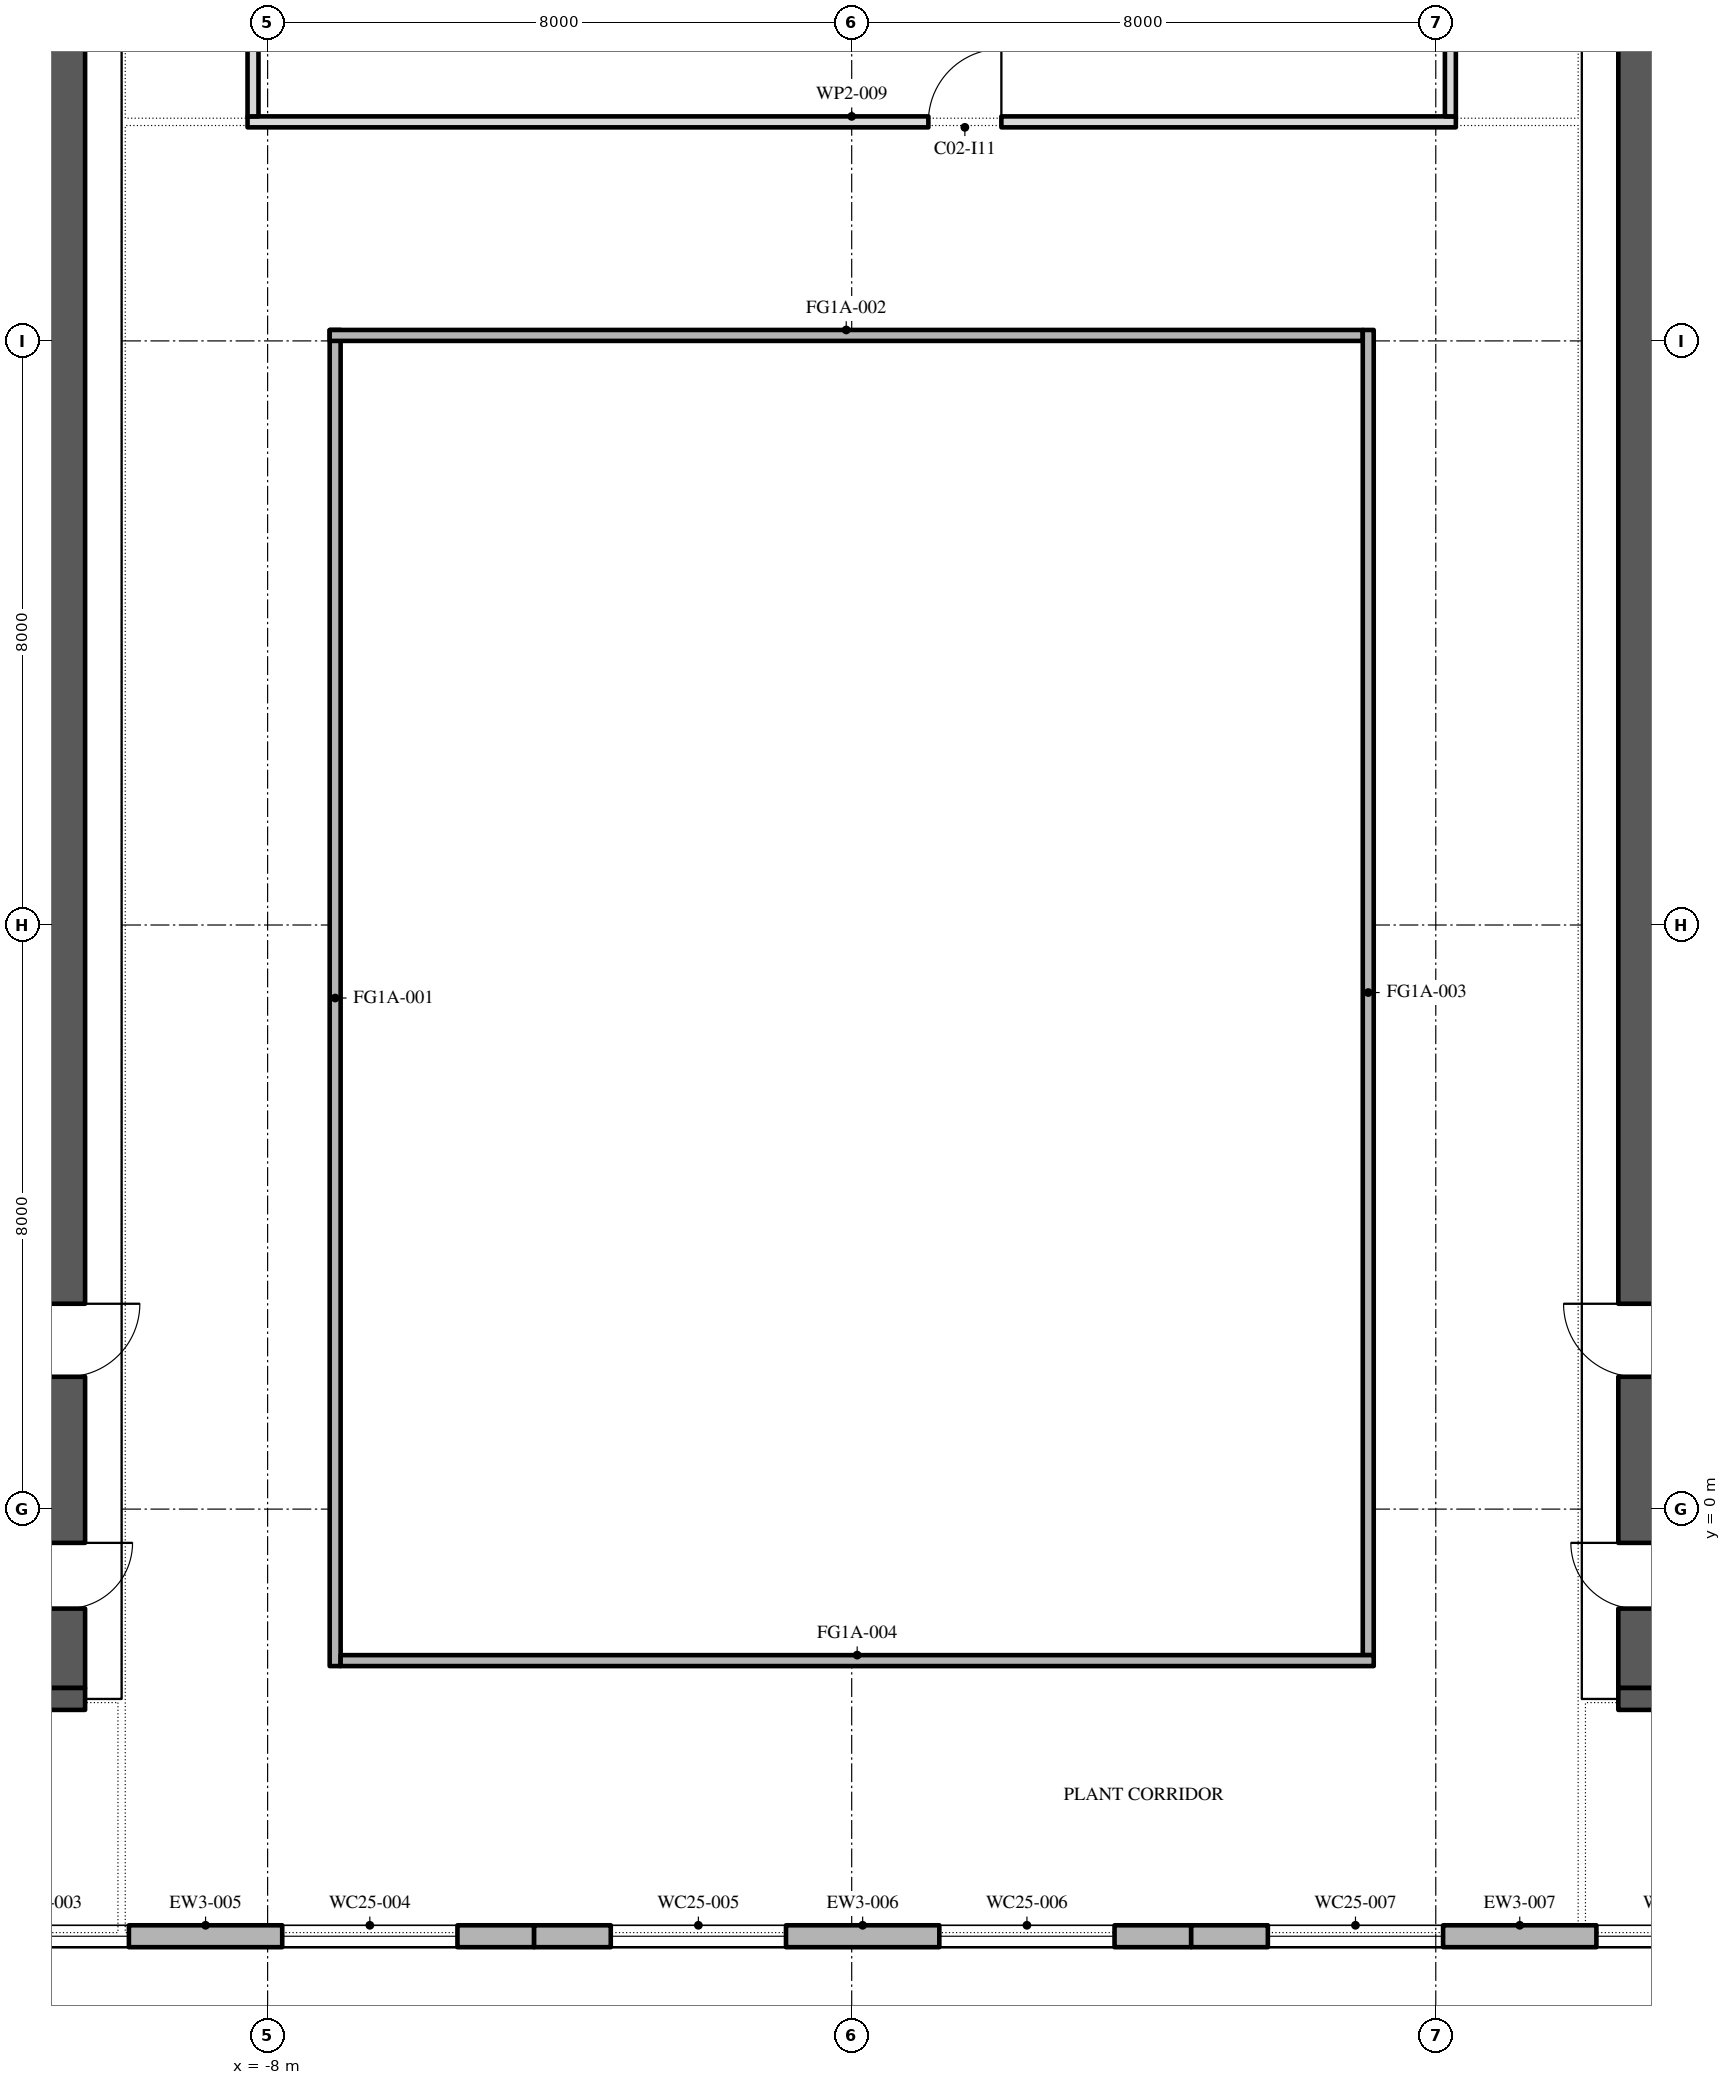
"""IFC4 building model, lengths in metres.
Left out: names, types, materials, properties, quantities, classifications, styles, units other than length and angle.
Written with IfcOpenShell. Run it as: python <this file> out.ifc"""

import sys

from ifc_helpers import new_model, si_unit, direction, frame, frame_2d, origin, place, context, subcontext, project, spatial, polyline, rectangle, outline, extrude, element, fill, save


model = new_model("IFC4")
c1 = context("Model", 3, precision=1e-05, world=origin(), true_north=direction((0.0, 1.0)))
c2 = subcontext(c1, "Body", "Model", "MODEL_VIEW")
j1 = project(units=[si_unit("LENGTHUNIT", "METRE"), si_unit("PLANEANGLEUNIT", "RADIAN")], contexts=[c1])
p1 = place(None, origin())
s1 = spatial("IfcSite", under=j1, at=p1, CompositionType="ELEMENT")
p2 = place(p1, origin())
s2 = spatial("IfcBuilding", under=s1, at=p2, CompositionType="ELEMENT")
p3 = place(p2, frame((0.0, 0.0, 373.2)))
s3 = spatial("IfcBuildingStorey", under=s2, at=p3, CompositionType="ELEMENT", Elevation=373.2)
p4 = place(p3, frame((-7.075, -2.15, 0.0), z_axis=(0.0, 0.0, 1.0), x_axis=(0.0, 1.0, 0.0)))
e1 = element("IfcWall", 1, at=p4, inside=s3, PredefinedType="STANDARD", context=c2, shape_type="SweptSolid", body=[
    extrude(rectangle(XDim=18.3, YDim=0.15, at=frame_2d((9.15, 0.0))), origin(), (0.0, 0.0, 1.0), 4.0),
])
p5 = place(p3, frame((-7.15, 16.075, 0.0), z_axis=(0.0, 0.0, 1.0), x_axis=(1.0, 0.0, 0.0)))
e2 = element("IfcWall", 2, at=p5, inside=s3, PredefinedType="STANDARD", context=c2, shape_type="SweptSolid", body=[
    extrude(rectangle(XDim=14.15, YDim=0.15, at=frame_2d((7.075, 0.0))), origin(), (0.0, 0.0, 1.0), 4.0),
])
p6 = place(p3, frame((7.075, 16.15, 0.0), z_axis=(0.0, 0.0, 1.0), x_axis=(0.0, -1.0, 0.0)))
e3 = element("IfcWall", 3, at=p6, inside=s3, PredefinedType="STANDARD", context=c2, shape_type="SweptSolid", body=[
    extrude(rectangle(XDim=18.15, YDim=0.15, at=frame_2d((9.075, 0.0))), origin(), (0.0, 0.0, 1.0), 4.0),
])
p7 = place(p3, frame((7.15, -2.075, 0.0), z_axis=(0.0, 0.0, 1.0), x_axis=(-1.0, 0.0, 0.0)))
e4 = element("IfcWall", 4, at=p7, inside=s3, PredefinedType="STANDARD", context=c2, shape_type="SweptSolid", body=[
    extrude(rectangle(XDim=14.15, YDim=0.15, at=frame_2d((7.075, 0.0))), origin(), (0.0, 0.0, 1.0), 4.0),
])
p8 = place(p3, frame((-13.35, -5.85, 0.0), z_axis=(0.0, 0.0, 1.0), x_axis=(1.0, 0.0, 0.0)))
e5 = element("IfcWall", 5, at=p8, inside=s3, PredefinedType="STANDARD", context=c2, shape_type="SweptSolid", body=[
    extrude(rectangle(XDim=9.0, YDim=0.3, at=frame_2d((4.5, 0.0))), origin(), (0.0, 0.0, 1.0), 4.0),
])
p9 = place(p8, frame((1.05, 0.0, 0.8)))
e6 = element("IfcOpeningElement", 6, at=p9, cuts=e5, PredefinedType="OPENING", context=c2, shape_type="SweptSolid", body=[
    extrude(outline(polyline([(0.0, 0.0), (2.4, 0.0), (2.4, 1.25), (2.377, 1.488), (2.31, 1.717), (2.2, 1.929), (2.051, 2.116), (1.87, 2.272), (1.663, 2.391), (1.437, 2.468), (1.2, 2.5), (0.963, 2.468), (0.737, 2.391), (0.53, 2.272), (0.349, 2.116), (0.2, 1.929), (0.09, 1.717), (0.023, 1.488), (0.0, 1.25), (0.0, 0.0)])), frame((0.0, 0.16, 0.0), z_axis=(0.0, -1.0, 0.0), x_axis=(1.0, 0.0, 0.0)), (0.0, 0.0, 1.0), 0.32),
])
p10 = place(p8, frame((5.55, 0.0, 0.8)))
e7 = element("IfcOpeningElement", 7, at=p10, cuts=e5, PredefinedType="OPENING", context=c2, shape_type="SweptSolid", body=[
    extrude(outline(polyline([(0.0, 0.0), (2.4, 0.0), (2.4, 1.25), (2.377, 1.488), (2.31, 1.717), (2.2, 1.929), (2.051, 2.116), (1.87, 2.272), (1.663, 2.391), (1.437, 2.468), (1.2, 2.5), (0.963, 2.468), (0.737, 2.391), (0.53, 2.272), (0.349, 2.116), (0.2, 1.929), (0.09, 1.717), (0.023, 1.488), (0.0, 1.25), (0.0, 0.0)])), frame((0.0, 0.16, 0.0), z_axis=(0.0, -1.0, 0.0), x_axis=(1.0, 0.0, 0.0)), (0.0, 0.0, 1.0), 0.32),
])
p11 = place(p3, frame((-4.35, -5.85, 0.0), z_axis=(0.0, 0.0, 1.0), x_axis=(1.0, 0.0, 0.0)))
e8 = element("IfcWall", 8, at=p11, inside=s3, PredefinedType="STANDARD", context=c2, shape_type="SweptSolid", body=[
    extrude(rectangle(XDim=9.0, YDim=0.3, at=frame_2d((4.5, 0.0))), origin(), (0.0, 0.0, 1.0), 4.0),
])
p12 = place(p11, frame((1.05, 0.0, 0.8)))
e9 = element("IfcOpeningElement", 9, at=p12, cuts=e8, PredefinedType="OPENING", context=c2, shape_type="SweptSolid", body=[
    extrude(outline(polyline([(0.0, 0.0), (2.4, 0.0), (2.4, 1.25), (2.377, 1.488), (2.31, 1.717), (2.2, 1.929), (2.051, 2.116), (1.87, 2.272), (1.663, 2.391), (1.437, 2.468), (1.2, 2.5), (0.963, 2.468), (0.737, 2.391), (0.53, 2.272), (0.349, 2.116), (0.2, 1.929), (0.09, 1.717), (0.023, 1.488), (0.0, 1.25), (0.0, 0.0)])), frame((0.0, 0.16, 0.0), z_axis=(0.0, -1.0, 0.0), x_axis=(1.0, 0.0, 0.0)), (0.0, 0.0, 1.0), 0.32),
])
p13 = place(p11, frame((5.55, 0.0, 0.8)))
e10 = element("IfcOpeningElement", 10, at=p13, cuts=e8, PredefinedType="OPENING", context=c2, shape_type="SweptSolid", body=[
    extrude(outline(polyline([(0.0, 0.0), (2.4, 0.0), (2.4, 1.25), (2.377, 1.488), (2.31, 1.717), (2.2, 1.929), (2.051, 2.116), (1.87, 2.272), (1.663, 2.391), (1.437, 2.468), (1.2, 2.5), (0.963, 2.468), (0.737, 2.391), (0.53, 2.272), (0.349, 2.116), (0.2, 1.929), (0.09, 1.717), (0.023, 1.488), (0.0, 1.25), (0.0, 0.0)])), frame((0.0, 0.16, 0.0), z_axis=(0.0, -1.0, 0.0), x_axis=(1.0, 0.0, 0.0)), (0.0, 0.0, 1.0), 0.32),
])
p14 = place(p3, frame((4.65, -5.85, 0.0), z_axis=(0.0, 0.0, 1.0), x_axis=(1.0, 0.0, 0.0)))
e11 = element("IfcWall", 11, at=p14, inside=s3, PredefinedType="STANDARD", context=c2, shape_type="SweptSolid", body=[
    extrude(rectangle(XDim=9.0, YDim=0.3, at=frame_2d((4.5, 0.0))), origin(), (0.0, 0.0, 1.0), 4.0),
])
p15 = place(p14, frame((1.05, 0.0, 0.8)))
e12 = element("IfcOpeningElement", 12, at=p15, cuts=e11, PredefinedType="OPENING", context=c2, shape_type="SweptSolid", body=[
    extrude(outline(polyline([(0.0, 0.0), (2.4, 0.0), (2.4, 1.25), (2.377, 1.488), (2.31, 1.717), (2.2, 1.929), (2.051, 2.116), (1.87, 2.272), (1.663, 2.391), (1.437, 2.468), (1.2, 2.5), (0.963, 2.468), (0.737, 2.391), (0.53, 2.272), (0.349, 2.116), (0.2, 1.929), (0.09, 1.717), (0.023, 1.488), (0.0, 1.25), (0.0, 0.0)])), frame((0.0, 0.16, 0.0), z_axis=(0.0, -1.0, 0.0), x_axis=(1.0, 0.0, 0.0)), (0.0, 0.0, 1.0), 0.32),
])
p16 = place(p14, frame((5.55, 0.0, 0.8)))
e13 = element("IfcOpeningElement", 13, at=p16, cuts=e11, PredefinedType="OPENING", context=c2, shape_type="SweptSolid", body=[
    extrude(outline(polyline([(0.0, 0.0), (2.4, 0.0), (2.4, 1.25), (2.377, 1.488), (2.31, 1.717), (2.2, 1.929), (2.051, 2.116), (1.87, 2.272), (1.663, 2.391), (1.437, 2.468), (1.2, 2.5), (0.963, 2.468), (0.737, 2.391), (0.53, 2.272), (0.349, 2.116), (0.2, 1.929), (0.09, 1.717), (0.023, 1.488), (0.0, 1.25), (0.0, 0.0)])), frame((0.0, 0.16, 0.0), z_axis=(0.0, -1.0, 0.0), x_axis=(1.0, 0.0, 0.0)), (0.0, 0.0, 1.0), 0.32),
])
p17 = place(p3, frame((-10.75, -2.45, 0.0), z_axis=(0.0, 0.0, 1.0), x_axis=(0.0, 1.0, 0.0)))
e14 = element("IfcWall", 14, at=p17, inside=s3, PredefinedType="SHEAR", context=c2, shape_type="SweptSolid", body=[
    extrude(rectangle(XDim=27.9, YDim=0.5, at=frame_2d((13.95, 0.0))), origin(), (0.0, 0.0, 1.0), 4.0),
])
p18 = place(p17, frame((23.65, 0.0, 0.0)))
e15 = element("IfcOpeningElement", 15, at=p18, cuts=e14, PredefinedType="OPENING", context=c2, shape_type="SweptSolid", body=[
    extrude(rectangle(XDim=2.4, YDim=2.1, at=frame_2d((1.2, 1.05))), frame((0.0, 0.26, 0.0), z_axis=(0.0, -1.0, 0.0), x_axis=(1.0, 0.0, 0.0)), (0.0, 0.0, 1.0), 0.52),
])
p19 = place(p17, frame((1.087, 0.0, 0.0)))
e16 = element("IfcOpeningElement", 16, at=p19, cuts=e14, PredefinedType="OPENING", context=c2, shape_type="SweptSolid", body=[
    extrude(rectangle(XDim=0.9, YDim=2.1, at=frame_2d((0.45, 1.05))), frame((0.0, 0.26, 0.0), z_axis=(0.0, -1.0, 0.0), x_axis=(1.0, 0.0, 0.0)), (0.0, 0.0, 1.0), 0.52),
])
p20 = place(p17, frame((4.262, 0.0, 0.0)))
e17 = element("IfcOpeningElement", 17, at=p20, cuts=e14, PredefinedType="OPENING", context=c2, shape_type="SweptSolid", body=[
    extrude(rectangle(XDim=1.0, YDim=2.1, at=frame_2d((0.5, 1.05))), frame((0.0, 0.26, 0.0), z_axis=(0.0, -1.0, 0.0), x_axis=(1.0, 0.0, 0.0)), (0.0, 0.0, 1.0), 0.52),
])
p21 = place(p3, frame((-21.5, -2.6, 0.0), z_axis=(0.0, 0.0, 1.0), x_axis=(1.0, 0.0, 0.0)))
e18 = element("IfcWall", 18, at=p21, inside=s3, PredefinedType="SHEAR", context=c2, shape_type="SweptSolid", body=[
    extrude(rectangle(XDim=11.0, YDim=0.3, at=frame_2d((5.5, 0.0))), origin(), (0.0, 0.0, 1.0), 4.0),
])
p22 = place(p3, frame((10.75, -2.45, 0.0), z_axis=(0.0, 0.0, 1.0), x_axis=(0.0, 1.0, 0.0)))
e19 = element("IfcWall", 19, at=p22, inside=s3, PredefinedType="SHEAR", context=c2, shape_type="SweptSolid", body=[
    extrude(rectangle(XDim=27.9, YDim=0.5, at=frame_2d((13.95, 0.0))), origin(), (0.0, 0.0, 1.0), 4.0),
])
p23 = place(p22, frame((23.65, 0.0, 0.0)))
e20 = element("IfcOpeningElement", 20, at=p23, cuts=e19, PredefinedType="OPENING", context=c2, shape_type="SweptSolid", body=[
    extrude(rectangle(XDim=2.4, YDim=2.1, at=frame_2d((1.2, 1.05))), frame((0.0, 0.26, 0.0), z_axis=(0.0, -1.0, 0.0), x_axis=(1.0, 0.0, 0.0)), (0.0, 0.0, 1.0), 0.52),
])
p24 = place(p22, frame((1.087, 0.0, 0.0)))
e21 = element("IfcOpeningElement", 21, at=p24, cuts=e19, PredefinedType="OPENING", context=c2, shape_type="SweptSolid", body=[
    extrude(rectangle(XDim=0.9, YDim=2.1, at=frame_2d((0.45, 1.05))), frame((0.0, 0.26, 0.0), z_axis=(0.0, -1.0, 0.0), x_axis=(1.0, 0.0, 0.0)), (0.0, 0.0, 1.0), 0.52),
])
p25 = place(p22, frame((4.262, 0.0, 0.0)))
e22 = element("IfcOpeningElement", 22, at=p25, cuts=e19, PredefinedType="OPENING", context=c2, shape_type="SweptSolid", body=[
    extrude(rectangle(XDim=1.0, YDim=2.1, at=frame_2d((0.5, 1.05))), frame((0.0, 0.26, 0.0), z_axis=(0.0, -1.0, 0.0), x_axis=(1.0, 0.0, 0.0)), (0.0, 0.0, 1.0), 0.52),
])
p26 = place(p3, frame((10.5, -2.6, 0.0), z_axis=(0.0, 0.0, 1.0), x_axis=(1.0, 0.0, 0.0)))
e23 = element("IfcWall", 23, at=p26, inside=s3, PredefinedType="SHEAR", context=c2, shape_type="SweptSolid", body=[
    extrude(rectangle(XDim=11.0, YDim=0.3, at=frame_2d((5.5, 0.0))), origin(), (0.0, 0.0, 1.0), 4.0),
])
p27 = place(p3, frame((-8.275, 19.0, 0.0), z_axis=(0.0, 0.0, 1.0), x_axis=(1.0, 0.0, 0.0)))
e24 = element("IfcWall", 24, at=p27, inside=s3, PredefinedType="PARTITIONING", context=c2, shape_type="SweptSolid", body=[
    extrude(rectangle(XDim=16.55, YDim=0.15, at=frame_2d((8.275, 0.0))), origin(), (0.0, 0.0, 1.0), 4.0),
])
p28 = place(p27, frame((9.325, 0.0, 0.0)))
e25 = element("IfcOpeningElement", 25, at=p28, cuts=e24, PredefinedType="OPENING", context=c2, shape_type="SweptSolid", body=[
    extrude(rectangle(XDim=1.0, YDim=2.1, at=frame_2d((0.5, 1.05))), frame((0.0, 0.085, 0.0), z_axis=(0.0, -1.0, 0.0), x_axis=(1.0, 0.0, 0.0)), (0.0, 0.0, 1.0), 0.17),
])
for number, where, z_axis, x_axis in (
    (26, (-8.2, 26.005, 0.0), (0.0, 0.0, 1.0), (0.0, -1.0, 0.0)),
    (27, (8.2, 19.075, 0.0), (0.0, 0.0, 1.0), (0.0, 1.0, 0.0)),
):
    element("IfcWall", number, at=place(p3, frame(where, z_axis=z_axis, x_axis=x_axis)), inside=s3, PredefinedType="PARTITIONING", context=c2, shape_type="SweptSolid", body=[
        extrude(rectangle(XDim=6.93, YDim=0.15, at=frame_2d((3.465, 0.0))), origin(), (0.0, 0.0, 1.0), 4.0),
    ])
p29 = place(p9, origin())
e28 = element("IfcWindow", 28, at=p29, inside=s3, PartitioningType="DOUBLE_PANEL_VERTICAL", PredefinedType="WINDOW", context=c2, shape_type="SweptSolid", body=[
    extrude(outline(polyline([(0.0, 0.0), (2.4, 0.0), (2.4, 1.25), (2.377, 1.488), (2.31, 1.717), (2.2, 1.929), (2.051, 2.116), (1.87, 2.272), (1.663, 2.391), (1.437, 2.468), (1.2, 2.5), (0.963, 2.468), (0.737, 2.391), (0.53, 2.272), (0.349, 2.116), (0.2, 1.929), (0.09, 1.717), (0.023, 1.488), (0.0, 1.25), (0.0, 0.0)])), frame((0.0, 0.03, 0.0), z_axis=(0.0, -1.0, 0.0), x_axis=(1.0, 0.0, 0.0)), (0.0, 0.0, 1.0), 0.06),
])
fill(e6, e28)
p30 = place(p10, origin())
e29 = element("IfcWindow", 29, at=p30, inside=s3, PartitioningType="DOUBLE_PANEL_VERTICAL", PredefinedType="WINDOW", context=c2, shape_type="SweptSolid", body=[
    extrude(outline(polyline([(0.0, 0.0), (2.4, 0.0), (2.4, 1.25), (2.377, 1.488), (2.31, 1.717), (2.2, 1.929), (2.051, 2.116), (1.87, 2.272), (1.663, 2.391), (1.437, 2.468), (1.2, 2.5), (0.963, 2.468), (0.737, 2.391), (0.53, 2.272), (0.349, 2.116), (0.2, 1.929), (0.09, 1.717), (0.023, 1.488), (0.0, 1.25), (0.0, 0.0)])), frame((0.0, 0.03, 0.0), z_axis=(0.0, -1.0, 0.0), x_axis=(1.0, 0.0, 0.0)), (0.0, 0.0, 1.0), 0.06),
])
fill(e7, e29)
p31 = place(p12, origin())
e30 = element("IfcWindow", 30, at=p31, inside=s3, PartitioningType="DOUBLE_PANEL_VERTICAL", PredefinedType="WINDOW", context=c2, shape_type="SweptSolid", body=[
    extrude(outline(polyline([(0.0, 0.0), (2.4, 0.0), (2.4, 1.25), (2.377, 1.488), (2.31, 1.717), (2.2, 1.929), (2.051, 2.116), (1.87, 2.272), (1.663, 2.391), (1.437, 2.468), (1.2, 2.5), (0.963, 2.468), (0.737, 2.391), (0.53, 2.272), (0.349, 2.116), (0.2, 1.929), (0.09, 1.717), (0.023, 1.488), (0.0, 1.25), (0.0, 0.0)])), frame((0.0, 0.03, 0.0), z_axis=(0.0, -1.0, 0.0), x_axis=(1.0, 0.0, 0.0)), (0.0, 0.0, 1.0), 0.06),
])
fill(e9, e30)
p32 = place(p13, origin())
e31 = element("IfcWindow", 31, at=p32, inside=s3, PartitioningType="DOUBLE_PANEL_VERTICAL", PredefinedType="WINDOW", context=c2, shape_type="SweptSolid", body=[
    extrude(outline(polyline([(0.0, 0.0), (2.4, 0.0), (2.4, 1.25), (2.377, 1.488), (2.31, 1.717), (2.2, 1.929), (2.051, 2.116), (1.87, 2.272), (1.663, 2.391), (1.437, 2.468), (1.2, 2.5), (0.963, 2.468), (0.737, 2.391), (0.53, 2.272), (0.349, 2.116), (0.2, 1.929), (0.09, 1.717), (0.023, 1.488), (0.0, 1.25), (0.0, 0.0)])), frame((0.0, 0.03, 0.0), z_axis=(0.0, -1.0, 0.0), x_axis=(1.0, 0.0, 0.0)), (0.0, 0.0, 1.0), 0.06),
])
fill(e10, e31)
p33 = place(p15, origin())
e32 = element("IfcWindow", 32, at=p33, inside=s3, PartitioningType="DOUBLE_PANEL_VERTICAL", PredefinedType="WINDOW", context=c2, shape_type="SweptSolid", body=[
    extrude(outline(polyline([(0.0, 0.0), (2.4, 0.0), (2.4, 1.25), (2.377, 1.488), (2.31, 1.717), (2.2, 1.929), (2.051, 2.116), (1.87, 2.272), (1.663, 2.391), (1.437, 2.468), (1.2, 2.5), (0.963, 2.468), (0.737, 2.391), (0.53, 2.272), (0.349, 2.116), (0.2, 1.929), (0.09, 1.717), (0.023, 1.488), (0.0, 1.25), (0.0, 0.0)])), frame((0.0, 0.03, 0.0), z_axis=(0.0, -1.0, 0.0), x_axis=(1.0, 0.0, 0.0)), (0.0, 0.0, 1.0), 0.06),
])
fill(e12, e32)
p34 = place(p16, origin())
e33 = element("IfcWindow", 33, at=p34, inside=s3, PartitioningType="DOUBLE_PANEL_VERTICAL", PredefinedType="WINDOW", context=c2, shape_type="SweptSolid", body=[
    extrude(outline(polyline([(0.0, 0.0), (2.4, 0.0), (2.4, 1.25), (2.377, 1.488), (2.31, 1.717), (2.2, 1.929), (2.051, 2.116), (1.87, 2.272), (1.663, 2.391), (1.437, 2.468), (1.2, 2.5), (0.963, 2.468), (0.737, 2.391), (0.53, 2.272), (0.349, 2.116), (0.2, 1.929), (0.09, 1.717), (0.023, 1.488), (0.0, 1.25), (0.0, 0.0)])), frame((0.0, 0.03, 0.0), z_axis=(0.0, -1.0, 0.0), x_axis=(1.0, 0.0, 0.0)), (0.0, 0.0, 1.0), 0.06),
])
fill(e13, e33)
p35 = place(p28, origin())
e34 = element("IfcDoor", 34, at=p35, inside=s3, OperationType="SINGLE_SWING_LEFT", PredefinedType="DOOR", context=c2, shape_type="SweptSolid", body=[
    extrude(rectangle(XDim=1.0, YDim=2.1, at=frame_2d((0.5, 1.05))), frame((0.0, 0.025, 0.0), z_axis=(0.0, -1.0, 0.0), x_axis=(1.0, 0.0, 0.0)), (0.0, 0.0, 1.0), 0.05),
])
fill(e25, e34)
save(model, sys.argv[1])
